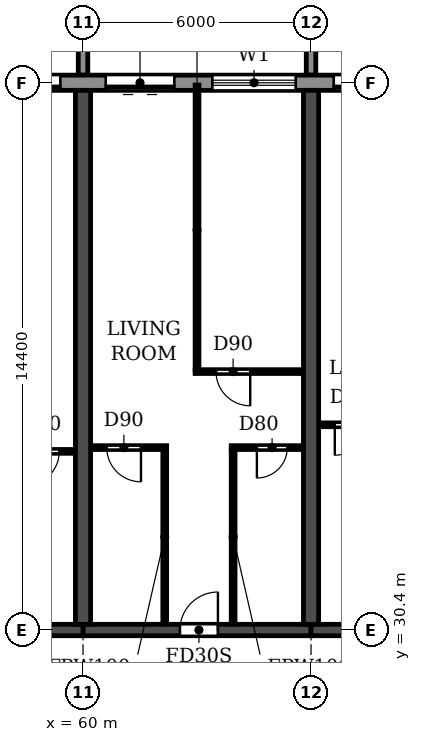
"""IFC4 building model, lengths in metres.
Left out: names, types, materials, properties, quantities, classifications, styles, units other than length and angle.
Written with IfcOpenShell. Run it as: python <this file> out.ifc"""

import sys

from ifc_helpers import new_model, si_unit, direction, frame, frame_2d, origin, place, context, subcontext, project, spatial, polyline, rectangle, outline, extrude, source, transform, mapped, element, fill, save


model = new_model("IFC4")
c1 = context("Model", 3, precision=1e-05, world=origin(), true_north=direction((0.0, 1.0)))
c2 = subcontext(c1, "Body", "Model", "MODEL_VIEW")
j1 = project(units=[si_unit("LENGTHUNIT", "METRE"), si_unit("PLANEANGLEUNIT", "RADIAN")], contexts=[c1])
p1 = place(None, origin())
s1 = spatial("IfcSite", under=j1, at=p1, CompositionType="ELEMENT")
p2 = place(p1, origin())
s2 = spatial("IfcBuilding", under=s1, at=p2, CompositionType="ELEMENT")
p3 = place(p2, frame((0.0, 0.0, 56.4)))
s3 = spatial("IfcBuildingStorey", under=s2, at=p3, CompositionType="ELEMENT", Elevation=56.4)
for number, where, z_axis, x_axis in (
    (1, (60.0, 30.55, 0.0), (0.0, 0.0, 1.0), (0.0, 1.0, 0.0)),
    (2, (66.0, 30.55, 0.0), (0.0, 0.0, 1.0), (0.0, 1.0, 0.0)),
):
    element("IfcWall", number, at=place(p3, frame(where, z_axis=z_axis, x_axis=x_axis)), inside=s3, PredefinedType="SHEAR", context=c2, shape_type="SweptSolid", body=[
        extrude(rectangle(XDim=14.05, YDim=0.4, at=frame_2d((7.025, 0.0))), origin(), (0.0, 0.0, 1.0), 3.05),
    ])
p4 = place(p3, frame((54.0, 30.4, 0.0), z_axis=(0.0, 0.0, 1.0), x_axis=(1.0, 0.0, 0.0)))
e3 = element("IfcWall", 3, at=p4, inside=s3, PredefinedType="SHEAR", context=c2, shape_type="SweptSolid", body=[
    extrude(rectangle(XDim=6.0, YDim=0.3, at=frame_2d((3.0, 0.0))), origin(), (0.0, 0.0, 1.0), 2.45),
])
p5 = place(p4, frame((2.45, 0.0, 0.0)))
e4 = element("IfcOpeningElement", 4, at=p5, cuts=e3, PredefinedType="OPENING", context=c2, shape_type="SweptSolid", body=[
    extrude(rectangle(XDim=1.0, YDim=2.1, at=frame_2d((0.5, 1.05))), frame((0.0, 0.16, 0.0), z_axis=(0.0, -1.0, 0.0), x_axis=(1.0, 0.0, 0.0)), (0.0, 0.0, 1.0), 0.32),
])
p6 = place(p3, frame((60.0, 30.4, 0.0), z_axis=(0.0, 0.0, 1.0), x_axis=(1.0, 0.0, 0.0)))
e5 = element("IfcWall", 5, at=p6, inside=s3, PredefinedType="SHEAR", context=c2, shape_type="SweptSolid", body=[
    extrude(rectangle(XDim=6.0, YDim=0.3, at=frame_2d((3.0, 0.0))), origin(), (0.0, 0.0, 1.0), 2.45),
])
p7 = place(p6, frame((2.55, 0.0, 0.0)))
e6 = element("IfcOpeningElement", 6, at=p7, cuts=e5, PredefinedType="OPENING", context=c2, shape_type="SweptSolid", body=[
    extrude(rectangle(XDim=1.0, YDim=2.1, at=frame_2d((0.5, 1.05))), frame((0.0, 0.16, 0.0), z_axis=(0.0, -1.0, 0.0), x_axis=(1.0, 0.0, 0.0)), (0.0, 0.0, 1.0), 0.32),
])
p8 = place(p3, frame((66.0, 30.4, 0.0), z_axis=(0.0, 0.0, 1.0), x_axis=(1.0, 0.0, 0.0)))
e7 = element("IfcWall", 7, at=p8, inside=s3, PredefinedType="SHEAR", context=c2, shape_type="SweptSolid", body=[
    extrude(rectangle(XDim=6.0, YDim=0.3, at=frame_2d((3.0, 0.0))), origin(), (0.0, 0.0, 1.0), 2.45),
])
p9 = place(p8, frame((2.45, 0.0, 0.0)))
e8 = element("IfcOpeningElement", 8, at=p9, cuts=e7, PredefinedType="OPENING", context=c2, shape_type="SweptSolid", body=[
    extrude(rectangle(XDim=1.0, YDim=2.1, at=frame_2d((0.5, 1.05))), frame((0.0, 0.16, 0.0), z_axis=(0.0, -1.0, 0.0), x_axis=(1.0, 0.0, 0.0)), (0.0, 0.0, 1.0), 0.32),
])
p10 = place(p3, frame((91.317, 44.8, 0.0), z_axis=(0.0, 0.0, 1.0), x_axis=(-1.0, 0.0, 0.0)))
e9 = element("IfcWall", 9, at=p10, inside=s3, PredefinedType="STANDARD", context=c2, shape_type="SweptSolid", body=[
    extrude(rectangle(XDim=80.634, YDim=0.4, at=frame_2d((40.317, 0.0))), origin(), (0.0, 0.0, 1.0), 3.05),
])
p11 = place(p10, frame((76.717, 0.0, 0.9)))
e10 = element("IfcOpeningElement", 10, at=p11, cuts=e9, PredefinedType="OPENING", context=c2, shape_type="SweptSolid", body=[
    extrude(rectangle(XDim=2.2, YDim=1.5, at=frame_2d((1.1, 0.75))), frame((0.0, 0.21, 0.0), z_axis=(0.0, -1.0, 0.0), x_axis=(1.0, 0.0, 0.0)), (0.0, 0.0, 1.0), 0.42),
])
p12 = place(p10, frame((73.917, 0.0, 0.0)))
e11 = element("IfcOpeningElement", 11, at=p12, cuts=e9, PredefinedType="OPENING", context=c2, shape_type="SweptSolid", body=[
    extrude(rectangle(XDim=1.8, YDim=2.4, at=frame_2d((0.9, 1.2))), frame((0.0, 0.21, 0.0), z_axis=(0.0, -1.0, 0.0), x_axis=(1.0, 0.0, 0.0)), (0.0, 0.0, 1.0), 0.42),
])
p13 = place(p10, frame((70.717, 0.0, 0.9)))
e12 = element("IfcOpeningElement", 12, at=p13, cuts=e9, PredefinedType="OPENING", context=c2, shape_type="SweptSolid", body=[
    extrude(rectangle(XDim=2.2, YDim=1.5, at=frame_2d((1.1, 0.75))), frame((0.0, 0.21, 0.0), z_axis=(0.0, -1.0, 0.0), x_axis=(1.0, 0.0, 0.0)), (0.0, 0.0, 1.0), 0.42),
])
p14 = place(p10, frame((67.917, 0.0, 0.0)))
e13 = element("IfcOpeningElement", 13, at=p14, cuts=e9, PredefinedType="OPENING", context=c2, shape_type="SweptSolid", body=[
    extrude(rectangle(XDim=1.8, YDim=2.4, at=frame_2d((0.9, 1.2))), frame((0.0, 0.21, 0.0), z_axis=(0.0, -1.0, 0.0), x_axis=(1.0, 0.0, 0.0)), (0.0, 0.0, 1.0), 0.42),
])
p15 = place(p10, frame((64.717, 0.0, 0.9)))
e14 = element("IfcOpeningElement", 14, at=p15, cuts=e9, PredefinedType="OPENING", context=c2, shape_type="SweptSolid", body=[
    extrude(rectangle(XDim=2.2, YDim=1.5, at=frame_2d((1.1, 0.75))), frame((0.0, 0.21, 0.0), z_axis=(0.0, -1.0, 0.0), x_axis=(1.0, 0.0, 0.0)), (0.0, 0.0, 1.0), 0.42),
])
p16 = place(p10, frame((61.917, 0.0, 0.0)))
e15 = element("IfcOpeningElement", 15, at=p16, cuts=e9, PredefinedType="OPENING", context=c2, shape_type="SweptSolid", body=[
    extrude(rectangle(XDim=1.8, YDim=2.4, at=frame_2d((0.9, 1.2))), frame((0.0, 0.21, 0.0), z_axis=(0.0, -1.0, 0.0), x_axis=(1.0, 0.0, 0.0)), (0.0, 0.0, 1.0), 0.42),
])
p17 = place(p10, frame((58.717, 0.0, 0.9)))
e16 = element("IfcOpeningElement", 16, at=p17, cuts=e9, PredefinedType="OPENING", context=c2, shape_type="SweptSolid", body=[
    extrude(rectangle(XDim=2.2, YDim=1.5, at=frame_2d((1.1, 0.75))), frame((0.0, 0.21, 0.0), z_axis=(0.0, -1.0, 0.0), x_axis=(1.0, 0.0, 0.0)), (0.0, 0.0, 1.0), 0.42),
])
p18 = place(p10, frame((55.717, 0.0, 0.9)))
e17 = element("IfcOpeningElement", 17, at=p18, cuts=e9, PredefinedType="OPENING", context=c2, shape_type="SweptSolid", body=[
    extrude(rectangle(XDim=2.2, YDim=1.5, at=frame_2d((1.1, 0.75))), frame((0.0, 0.21, 0.0), z_axis=(0.0, -1.0, 0.0), x_axis=(1.0, 0.0, 0.0)), (0.0, 0.0, 1.0), 0.42),
])
p19 = place(p10, frame((52.917, 0.0, 0.0)))
e18 = element("IfcOpeningElement", 18, at=p19, cuts=e9, PredefinedType="OPENING", context=c2, shape_type="SweptSolid", body=[
    extrude(rectangle(XDim=1.8, YDim=2.4, at=frame_2d((0.9, 1.2))), frame((0.0, 0.21, 0.0), z_axis=(0.0, -1.0, 0.0), x_axis=(1.0, 0.0, 0.0)), (0.0, 0.0, 1.0), 0.42),
])
p20 = place(p10, frame((49.717, 0.0, 0.9)))
e19 = element("IfcOpeningElement", 19, at=p20, cuts=e9, PredefinedType="OPENING", context=c2, shape_type="SweptSolid", body=[
    extrude(rectangle(XDim=2.2, YDim=1.5, at=frame_2d((1.1, 0.75))), frame((0.0, 0.21, 0.0), z_axis=(0.0, -1.0, 0.0), x_axis=(1.0, 0.0, 0.0)), (0.0, 0.0, 1.0), 0.42),
])
p21 = place(p10, frame((46.917, 0.0, 0.0)))
e20 = element("IfcOpeningElement", 20, at=p21, cuts=e9, PredefinedType="OPENING", context=c2, shape_type="SweptSolid", body=[
    extrude(rectangle(XDim=1.8, YDim=2.4, at=frame_2d((0.9, 1.2))), frame((0.0, 0.21, 0.0), z_axis=(0.0, -1.0, 0.0), x_axis=(1.0, 0.0, 0.0)), (0.0, 0.0, 1.0), 0.42),
])
p22 = place(p10, frame((43.717, 0.0, 0.9)))
e21 = element("IfcOpeningElement", 21, at=p22, cuts=e9, PredefinedType="OPENING", context=c2, shape_type="SweptSolid", body=[
    extrude(rectangle(XDim=2.2, YDim=1.5, at=frame_2d((1.1, 0.75))), frame((0.0, 0.21, 0.0), z_axis=(0.0, -1.0, 0.0), x_axis=(1.0, 0.0, 0.0)), (0.0, 0.0, 1.0), 0.42),
])
p23 = place(p10, frame((40.717, 0.0, 0.9)))
e22 = element("IfcOpeningElement", 22, at=p23, cuts=e9, PredefinedType="OPENING", context=c2, shape_type="SweptSolid", body=[
    extrude(rectangle(XDim=2.2, YDim=1.5, at=frame_2d((1.1, 0.75))), frame((0.0, 0.21, 0.0), z_axis=(0.0, -1.0, 0.0), x_axis=(1.0, 0.0, 0.0)), (0.0, 0.0, 1.0), 0.42),
])
p24 = place(p10, frame((37.717, 0.0, 0.9)))
e23 = element("IfcOpeningElement", 23, at=p24, cuts=e9, PredefinedType="OPENING", context=c2, shape_type="SweptSolid", body=[
    extrude(rectangle(XDim=2.2, YDim=1.5, at=frame_2d((1.1, 0.75))), frame((0.0, 0.21, 0.0), z_axis=(0.0, -1.0, 0.0), x_axis=(1.0, 0.0, 0.0)), (0.0, 0.0, 1.0), 0.42),
])
p25 = place(p10, frame((34.717, 0.0, 0.9)))
e24 = element("IfcOpeningElement", 24, at=p25, cuts=e9, PredefinedType="OPENING", context=c2, shape_type="SweptSolid", body=[
    extrude(rectangle(XDim=2.2, YDim=1.5, at=frame_2d((1.1, 0.75))), frame((0.0, 0.21, 0.0), z_axis=(0.0, -1.0, 0.0), x_axis=(1.0, 0.0, 0.0)), (0.0, 0.0, 1.0), 0.42),
])
p26 = place(p10, frame((31.917, 0.0, 0.0)))
e25 = element("IfcOpeningElement", 25, at=p26, cuts=e9, PredefinedType="OPENING", context=c2, shape_type="SweptSolid", body=[
    extrude(rectangle(XDim=1.8, YDim=2.4, at=frame_2d((0.9, 1.2))), frame((0.0, 0.21, 0.0), z_axis=(0.0, -1.0, 0.0), x_axis=(1.0, 0.0, 0.0)), (0.0, 0.0, 1.0), 0.42),
])
p27 = place(p10, frame((28.917, 0.0, 0.0)))
e26 = element("IfcOpeningElement", 26, at=p27, cuts=e9, PredefinedType="OPENING", context=c2, shape_type="SweptSolid", body=[
    extrude(rectangle(XDim=1.8, YDim=2.4, at=frame_2d((0.9, 1.2))), frame((0.0, 0.21, 0.0), z_axis=(0.0, -1.0, 0.0), x_axis=(1.0, 0.0, 0.0)), (0.0, 0.0, 1.0), 0.42),
])
p28 = place(p10, frame((25.717, 0.0, 0.9)))
e27 = element("IfcOpeningElement", 27, at=p28, cuts=e9, PredefinedType="OPENING", context=c2, shape_type="SweptSolid", body=[
    extrude(rectangle(XDim=2.2, YDim=1.5, at=frame_2d((1.1, 0.75))), frame((0.0, 0.21, 0.0), z_axis=(0.0, -1.0, 0.0), x_axis=(1.0, 0.0, 0.0)), (0.0, 0.0, 1.0), 0.42),
])
p29 = place(p10, frame((22.917, 0.0, 0.0)))
e28 = element("IfcOpeningElement", 28, at=p29, cuts=e9, PredefinedType="OPENING", context=c2, shape_type="SweptSolid", body=[
    extrude(rectangle(XDim=1.8, YDim=2.4, at=frame_2d((0.9, 1.2))), frame((0.0, 0.21, 0.0), z_axis=(0.0, -1.0, 0.0), x_axis=(1.0, 0.0, 0.0)), (0.0, 0.0, 1.0), 0.42),
])
p30 = place(p10, frame((19.717, 0.0, 0.9)))
e29 = element("IfcOpeningElement", 29, at=p30, cuts=e9, PredefinedType="OPENING", context=c2, shape_type="SweptSolid", body=[
    extrude(rectangle(XDim=2.2, YDim=1.5, at=frame_2d((1.1, 0.75))), frame((0.0, 0.21, 0.0), z_axis=(0.0, -1.0, 0.0), x_axis=(1.0, 0.0, 0.0)), (0.0, 0.0, 1.0), 0.42),
])
p31 = place(p10, frame((16.917, 0.0, 0.0)))
e30 = element("IfcOpeningElement", 30, at=p31, cuts=e9, PredefinedType="OPENING", context=c2, shape_type="SweptSolid", body=[
    extrude(rectangle(XDim=1.8, YDim=2.4, at=frame_2d((0.9, 1.2))), frame((0.0, 0.21, 0.0), z_axis=(0.0, -1.0, 0.0), x_axis=(1.0, 0.0, 0.0)), (0.0, 0.0, 1.0), 0.42),
])
p32 = place(p10, frame((13.717, 0.0, 0.9)))
e31 = element("IfcOpeningElement", 31, at=p32, cuts=e9, PredefinedType="OPENING", context=c2, shape_type="SweptSolid", body=[
    extrude(rectangle(XDim=2.2, YDim=1.5, at=frame_2d((1.1, 0.75))), frame((0.0, 0.21, 0.0), z_axis=(0.0, -1.0, 0.0), x_axis=(1.0, 0.0, 0.0)), (0.0, 0.0, 1.0), 0.42),
])
p33 = place(p10, frame((10.917, 0.0, 0.0)))
e32 = element("IfcOpeningElement", 32, at=p33, cuts=e9, PredefinedType="OPENING", context=c2, shape_type="SweptSolid", body=[
    extrude(rectangle(XDim=1.8, YDim=2.4, at=frame_2d((0.9, 1.2))), frame((0.0, 0.21, 0.0), z_axis=(0.0, -1.0, 0.0), x_axis=(1.0, 0.0, 0.0)), (0.0, 0.0, 1.0), 0.42),
])
p34 = place(p10, frame((7.717, 0.0, 0.9)))
e33 = element("IfcOpeningElement", 33, at=p34, cuts=e9, PredefinedType="OPENING", context=c2, shape_type="SweptSolid", body=[
    extrude(rectangle(XDim=2.2, YDim=1.5, at=frame_2d((1.1, 0.75))), frame((0.0, 0.21, 0.0), z_axis=(0.0, -1.0, 0.0), x_axis=(1.0, 0.0, 0.0)), (0.0, 0.0, 1.0), 0.42),
])
p35 = place(p10, frame((4.717, 0.0, 0.9)))
e34 = element("IfcOpeningElement", 34, at=p35, cuts=e9, PredefinedType="OPENING", context=c2, shape_type="SweptSolid", body=[
    extrude(rectangle(XDim=2.2, YDim=1.5, at=frame_2d((1.1, 0.75))), frame((0.0, 0.21, 0.0), z_axis=(0.0, -1.0, 0.0), x_axis=(1.0, 0.0, 0.0)), (0.0, 0.0, 1.0), 0.42),
])
p36 = place(p10, frame((1.717, 0.0, 0.9)))
e35 = element("IfcOpeningElement", 35, at=p36, cuts=e9, PredefinedType="OPENING", context=c2, shape_type="SweptSolid", body=[
    extrude(rectangle(XDim=2.2, YDim=1.5, at=frame_2d((1.1, 0.75))), frame((0.0, 0.21, 0.0), z_axis=(0.0, -1.0, 0.0), x_axis=(1.0, 0.0, 0.0)), (0.0, 0.0, 1.0), 0.42),
])
m1 = source(origin(), c2, "Body", "SweptSolid", [
    extrude(outline(polyline([(0.0, 0.0), (0.25, 0.0), (0.25, 3.1), (0.0, 3.1), (0.0, 0.0)])), origin(), (0.0, 0.0, 1.0), 3.1),
])
for number, where in (
    (36, (59.875, 45.0, 0.0)),
    (37, (65.875, 45.0, 0.0)),
):
    element("IfcWall", number, at=place(p3, frame(where)), inside=s3, PredefinedType="STANDARD", context=c2, shape_type="MappedRepresentation", body=[
        mapped(m1, transform((0.0, 0.0, 0.0))),
    ])
p37 = place(p3, frame((57.8, 35.1, 0.0), z_axis=(0.0, 0.0, 1.0), x_axis=(1.0, 0.0, 0.0)))
e38 = element("IfcWall", 38, at=p37, inside=s3, PredefinedType="PARTITIONING", context=c2, shape_type="SweptSolid", body=[
    extrude(rectangle(XDim=1.99, YDim=0.1, at=frame_2d((0.995, 0.0))), origin(), (0.0, 0.0, 1.0), 3.05),
])
p38 = place(p37, frame((0.675, 0.0, 0.0)))
e39 = element("IfcOpeningElement", 39, at=p38, cuts=e38, PredefinedType="OPENING", context=c2, shape_type="SweptSolid", body=[
    extrude(rectangle(XDim=0.9, YDim=2.1, at=frame_2d((0.45, 1.05))), frame((0.0, 0.06, 0.0), z_axis=(0.0, -1.0, 0.0), x_axis=(1.0, 0.0, 0.0)), (0.0, 0.0, 1.0), 0.12),
])
p39 = place(p3, frame((60.21, 35.2, 0.0), z_axis=(0.0, 0.0, 1.0), x_axis=(1.0, 0.0, 0.0)))
e40 = element("IfcWall", 40, at=p39, inside=s3, PredefinedType="PARTITIONING", context=c2, shape_type="SweptSolid", body=[
    extrude(rectangle(XDim=1.99, YDim=0.1, at=frame_2d((0.995, 0.0))), origin(), (0.0, 0.0, 1.0), 3.05),
])
p40 = place(p39, frame((0.415, 0.0, 0.0)))
e41 = element("IfcOpeningElement", 41, at=p40, cuts=e40, PredefinedType="OPENING", context=c2, shape_type="SweptSolid", body=[
    extrude(rectangle(XDim=0.9, YDim=2.1, at=frame_2d((0.45, 1.05))), frame((0.0, 0.06, 0.0), z_axis=(0.0, -1.0, 0.0), x_axis=(1.0, 0.0, 0.0)), (0.0, 0.0, 1.0), 0.12),
])
p41 = place(p3, frame((63.9, 35.2, 0.0), z_axis=(0.0, 0.0, 1.0), x_axis=(1.0, 0.0, 0.0)))
e42 = element("IfcWall", 42, at=p41, inside=s3, PredefinedType="PARTITIONING", context=c2, shape_type="SweptSolid", body=[
    extrude(rectangle(XDim=1.89, YDim=0.1, at=frame_2d((0.945, 0.0))), origin(), (0.0, 0.0, 1.0), 3.05),
])
p42 = place(p41, frame((0.675, 0.0, 0.0)))
e43 = element("IfcOpeningElement", 43, at=p42, cuts=e42, PredefinedType="OPENING", context=c2, shape_type="SweptSolid", body=[
    extrude(rectangle(XDim=0.8, YDim=2.1, at=frame_2d((0.4, 1.05))), frame((0.0, 0.06, 0.0), z_axis=(0.0, -1.0, 0.0), x_axis=(1.0, 0.0, 0.0)), (0.0, 0.0, 1.0), 0.12),
])
p43 = place(p3, frame((66.21, 35.8, 0.0), z_axis=(0.0, 0.0, 1.0), x_axis=(1.0, 0.0, 0.0)))
e44 = element("IfcWall", 44, at=p43, inside=s3, PredefinedType="PARTITIONING", context=c2, shape_type="SweptSolid", body=[
    extrude(rectangle(XDim=1.89, YDim=0.1, at=frame_2d((0.945, 0.0))), origin(), (0.0, 0.0, 1.0), 3.05),
])
p44 = place(p43, frame((0.415, 0.0, 0.0)))
e45 = element("IfcOpeningElement", 45, at=p44, cuts=e44, PredefinedType="OPENING", context=c2, shape_type="SweptSolid", body=[
    extrude(rectangle(XDim=0.8, YDim=2.1, at=frame_2d((0.4, 1.05))), frame((0.0, 0.06, 0.0), z_axis=(0.0, -1.0, 0.0), x_axis=(1.0, 0.0, 0.0)), (0.0, 0.0, 1.0), 0.12),
])
p45 = place(p3, frame((62.95, 37.2, 0.0), z_axis=(0.0, 0.0, 1.0), x_axis=(1.0, 0.0, 0.0)))
e46 = element("IfcWall", 46, at=p45, inside=s3, PredefinedType="PARTITIONING", context=c2, shape_type="SweptSolid", body=[
    extrude(rectangle(XDim=2.84, YDim=0.1, at=frame_2d((1.42, 0.0))), origin(), (0.0, 0.0, 1.0), 3.05),
])
p46 = place(p45, frame((0.55, 0.0, 0.0)))
e47 = element("IfcOpeningElement", 47, at=p46, cuts=e46, PredefinedType="OPENING", context=c2, shape_type="SweptSolid", body=[
    extrude(rectangle(XDim=0.9, YDim=2.1, at=frame_2d((0.45, 1.05))), frame((0.0, 0.06, 0.0), z_axis=(0.0, -1.0, 0.0), x_axis=(1.0, 0.0, 0.0)), (0.0, 0.0, 1.0), 0.12),
])
p47 = place(p3, frame((62.15, 30.56, 0.0), z_axis=(0.0, 0.0, 1.0), x_axis=(0.0, 1.0, 0.0)))
e48 = element("IfcWall", 48, at=p47, inside=s3, PredefinedType="PARTITIONING", context=c2, shape_type="SweptSolid", body=[
    extrude(rectangle(XDim=4.59, YDim=0.1, at=frame_2d((2.295, 0.0))), origin(), (0.0, 0.0, 1.0), 3.05),
])
p48 = place(p3, frame((63.0, 37.25, 0.0), z_axis=(0.0, 0.0, 1.0), x_axis=(0.0, 1.0, 0.0)))
e49 = element("IfcWall", 49, at=p48, inside=s3, PredefinedType="PARTITIONING", context=c2, shape_type="SweptSolid", body=[
    extrude(rectangle(XDim=7.49, YDim=0.1, at=frame_2d((3.745, 0.0))), origin(), (0.0, 0.0, 1.0), 3.05),
])
p49 = place(p3, frame((63.95, 30.56, 0.0), z_axis=(0.0, 0.0, 1.0), x_axis=(0.0, 1.0, 0.0)))
e50 = element("IfcWall", 50, at=p49, inside=s3, PredefinedType="PARTITIONING", context=c2, shape_type="SweptSolid", body=[
    extrude(rectangle(XDim=4.59, YDim=0.1, at=frame_2d((2.295, 0.0))), origin(), (0.0, 0.0, 1.0), 3.05),
])
p50 = place(p26, origin())
e51 = element("IfcDoor", 51, at=p50, inside=s3, OperationType="DOUBLE_DOOR_SLIDING", PredefinedType="DOOR", context=c2, shape_type="SweptSolid", body=[
    extrude(rectangle(XDim=1.8, YDim=2.4, at=frame_2d((0.9, 1.2))), frame((0.0, 0.025, 0.0), z_axis=(0.0, -1.0, 0.0), x_axis=(1.0, 0.0, 0.0)), (0.0, 0.0, 1.0), 0.05),
])
fill(e25, e51)
p51 = place(p27, origin())
e52 = element("IfcDoor", 52, at=p51, inside=s3, OperationType="DOUBLE_DOOR_SLIDING", PredefinedType="DOOR", context=c2, shape_type="SweptSolid", body=[
    extrude(rectangle(XDim=1.8, YDim=2.4, at=frame_2d((0.9, 1.2))), frame((0.0, 0.025, 0.0), z_axis=(0.0, -1.0, 0.0), x_axis=(1.0, 0.0, 0.0)), (0.0, 0.0, 1.0), 0.05),
])
fill(e26, e52)
p52 = place(p28, origin())
e53 = element("IfcWindow", 53, at=p52, inside=s3, PartitioningType="DOUBLE_PANEL_HORIZONTAL", PredefinedType="WINDOW", context=c2, shape_type="SweptSolid", body=[
    extrude(rectangle(XDim=2.2, YDim=1.5, at=frame_2d((1.1, 0.75))), frame((0.0, 0.03, 0.0), z_axis=(0.0, -1.0, 0.0), x_axis=(1.0, 0.0, 0.0)), (0.0, 0.0, 1.0), 0.06),
])
fill(e27, e53)
p53 = place(p29, origin())
e54 = element("IfcDoor", 54, at=p53, inside=s3, OperationType="DOUBLE_DOOR_SLIDING", PredefinedType="DOOR", context=c2, shape_type="SweptSolid", body=[
    extrude(rectangle(XDim=1.8, YDim=2.4, at=frame_2d((0.9, 1.2))), frame((0.0, 0.025, 0.0), z_axis=(0.0, -1.0, 0.0), x_axis=(1.0, 0.0, 0.0)), (0.0, 0.0, 1.0), 0.05),
])
fill(e28, e54)
p54 = place(p38, frame((0.9, 0.0, 0.0), z_axis=(0.0, 0.0, 1.0), x_axis=(-1.0, 0.0, 0.0)))
e55 = element("IfcDoor", 55, at=p54, inside=s3, OperationType="SINGLE_SWING_RIGHT", PredefinedType="DOOR", context=c2, shape_type="SweptSolid", body=[
    extrude(rectangle(XDim=0.9, YDim=2.1, at=frame_2d((0.45, 1.05))), frame((0.0, 0.025, 0.0), z_axis=(0.0, -1.0, 0.0), x_axis=(1.0, 0.0, 0.0)), (0.0, 0.0, 1.0), 0.05),
])
fill(e39, e55)
p55 = place(p40, frame((0.9, 0.0, 0.0), z_axis=(0.0, 0.0, 1.0), x_axis=(-1.0, 0.0, 0.0)))
e56 = element("IfcDoor", 56, at=p55, inside=s3, OperationType="SINGLE_SWING_LEFT", PredefinedType="DOOR", context=c2, shape_type="SweptSolid", body=[
    extrude(rectangle(XDim=0.9, YDim=2.1, at=frame_2d((0.45, 1.05))), frame((0.0, 0.025, 0.0), z_axis=(0.0, -1.0, 0.0), x_axis=(1.0, 0.0, 0.0)), (0.0, 0.0, 1.0), 0.05),
])
fill(e41, e56)
p56 = place(p7, origin())
e57 = element("IfcDoor", 57, at=p56, inside=s3, OperationType="SINGLE_SWING_RIGHT", PredefinedType="DOOR", context=c2, shape_type="SweptSolid", body=[
    extrude(rectangle(XDim=1.0, YDim=2.1, at=frame_2d((0.5, 1.05))), frame((0.0, 0.025, 0.0), z_axis=(0.0, -1.0, 0.0), x_axis=(1.0, 0.0, 0.0)), (0.0, 0.0, 1.0), 0.05),
])
fill(e6, e57)
p57 = place(p46, frame((0.9, 0.0, 0.0), z_axis=(0.0, 0.0, 1.0), x_axis=(-1.0, 0.0, 0.0)))
e58 = element("IfcDoor", 58, at=p57, inside=s3, OperationType="SINGLE_SWING_LEFT", PredefinedType="DOOR", context=c2, shape_type="SweptSolid", body=[
    extrude(rectangle(XDim=0.9, YDim=2.1, at=frame_2d((0.45, 1.05))), frame((0.0, 0.025, 0.0), z_axis=(0.0, -1.0, 0.0), x_axis=(1.0, 0.0, 0.0)), (0.0, 0.0, 1.0), 0.05),
])
fill(e47, e58)
p58 = place(p42, frame((0.8, 0.0, 0.0), z_axis=(0.0, 0.0, 1.0), x_axis=(-1.0, 0.0, 0.0)))
e59 = element("IfcDoor", 59, at=p58, inside=s3, OperationType="SINGLE_SWING_RIGHT", PredefinedType="DOOR", context=c2, shape_type="SweptSolid", body=[
    extrude(rectangle(XDim=0.8, YDim=2.1, at=frame_2d((0.4, 1.05))), frame((0.0, 0.025, 0.0), z_axis=(0.0, -1.0, 0.0), x_axis=(1.0, 0.0, 0.0)), (0.0, 0.0, 1.0), 0.05),
])
fill(e43, e59)
p59 = place(p44, frame((0.8, 0.0, 0.0), z_axis=(0.0, 0.0, 1.0), x_axis=(-1.0, 0.0, 0.0)))
e60 = element("IfcDoor", 60, at=p59, inside=s3, OperationType="SINGLE_SWING_RIGHT", PredefinedType="DOOR", context=c2, shape_type="SweptSolid", body=[
    extrude(rectangle(XDim=0.8, YDim=2.1, at=frame_2d((0.4, 1.05))), frame((0.0, 0.025, 0.0), z_axis=(0.0, -1.0, 0.0), x_axis=(1.0, 0.0, 0.0)), (0.0, 0.0, 1.0), 0.05),
])
fill(e45, e60)
save(model, sys.argv[1])
